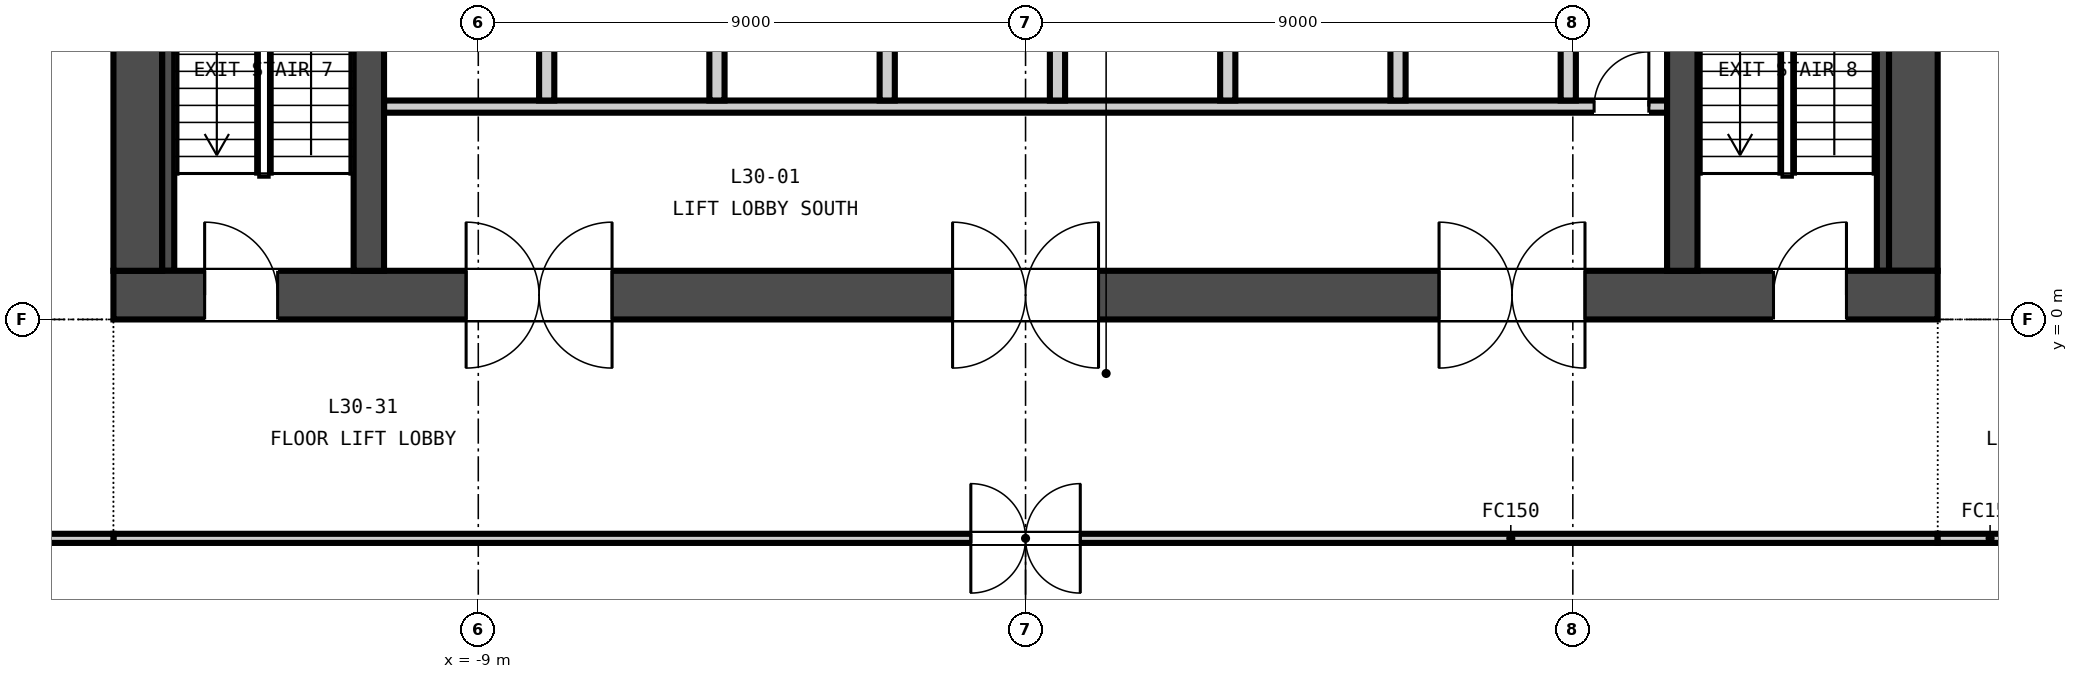
"""IFC4 building model, lengths in metres.
Left out: names, types, materials, properties, quantities, classifications, styles, units other than length and angle.
Written with IfcOpenShell. Run it as: python <this file> out.ifc"""

import sys

from ifc_helpers import new_model, si_unit, direction, frame, frame_2d, origin, place, context, subcontext, project, spatial, rectangle, extrude, element, fill, save


model = new_model("IFC4")
c1 = context("Model", 3, precision=1e-05, world=origin(), true_north=direction((0.0, 1.0)))
c2 = subcontext(c1, "Body", "Model", "MODEL_VIEW")
j1 = project(units=[si_unit("LENGTHUNIT", "METRE"), si_unit("PLANEANGLEUNIT", "RADIAN")], contexts=[c1])
p1 = place(None, origin())
s1 = spatial("IfcSite", under=j1, at=p1, CompositionType="ELEMENT")
p2 = place(p1, origin())
s2 = spatial("IfcBuilding", under=s1, at=p2, CompositionType="ELEMENT")
p3 = place(p2, frame((0.0, 0.0, 126.15)))
s3 = spatial("IfcBuildingStorey", under=s2, at=p3, CompositionType="ELEMENT", Elevation=126.15)
p4 = place(p3, frame((-15.0, 0.4, -0.15), z_axis=(0.0, 0.0, 1.0), x_axis=(1.0, 0.0, 0.0)))
e1 = element("IfcWall", 1, at=p4, inside=s3, PredefinedType="SOLIDWALL", context=c2, shape_type="SweptSolid", body=[
    extrude(rectangle(XDim=30.0, YDim=0.8, at=frame_2d((15.0, 0.0))), origin(), (0.0, 0.0, 1.0), 3.65),
])
p5 = place(p4, frame((5.8, 0.0, 0.15)))
e2 = element("IfcOpeningElement", 2, at=p5, cuts=e1, PredefinedType="OPENING", context=c2, shape_type="SweptSolid", body=[
    extrude(rectangle(XDim=2.4, YDim=2.4, at=frame_2d((1.2, 1.2))), frame((0.0, 0.41, 0.0), z_axis=(0.0, -1.0, 0.0), x_axis=(1.0, 0.0, 0.0)), (0.0, 0.0, 1.0), 0.82),
])
p6 = place(p4, frame((13.8, 0.0, 0.15)))
e3 = element("IfcOpeningElement", 3, at=p6, cuts=e1, PredefinedType="OPENING", context=c2, shape_type="SweptSolid", body=[
    extrude(rectangle(XDim=2.4, YDim=2.4, at=frame_2d((1.2, 1.2))), frame((0.0, 0.41, 0.0), z_axis=(0.0, -1.0, 0.0), x_axis=(1.0, 0.0, 0.0)), (0.0, 0.0, 1.0), 0.82),
])
p7 = place(p4, frame((21.8, 0.0, 0.15)))
e4 = element("IfcOpeningElement", 4, at=p7, cuts=e1, PredefinedType="OPENING", context=c2, shape_type="SweptSolid", body=[
    extrude(rectangle(XDim=2.4, YDim=2.4, at=frame_2d((1.2, 1.2))), frame((0.0, 0.41, 0.0), z_axis=(0.0, -1.0, 0.0), x_axis=(1.0, 0.0, 0.0)), (0.0, 0.0, 1.0), 0.82),
])
p8 = place(p4, frame((1.5, 0.0, 0.15)))
e5 = element("IfcOpeningElement", 5, at=p8, cuts=e1, PredefinedType="OPENING", context=c2, shape_type="SweptSolid", body=[
    extrude(rectangle(XDim=1.2, YDim=2.1, at=frame_2d((0.6, 1.05))), frame((0.0, 0.41, 0.0), z_axis=(0.0, -1.0, 0.0), x_axis=(1.0, 0.0, 0.0)), (0.0, 0.0, 1.0), 0.82),
])
p9 = place(p4, frame((27.3, 0.0, 0.15)))
e6 = element("IfcOpeningElement", 6, at=p9, cuts=e1, PredefinedType="OPENING", context=c2, shape_type="SweptSolid", body=[
    extrude(rectangle(XDim=1.2, YDim=2.1, at=frame_2d((0.6, 1.05))), frame((0.0, 0.41, 0.0), z_axis=(0.0, -1.0, 0.0), x_axis=(1.0, 0.0, 0.0)), (0.0, 0.0, 1.0), 0.82),
])
for number, where, z_axis, x_axis in (
    (7, (-14.6, 0.8, -0.15), (0.0, 0.0, 1.0), (0.0, 1.0, 0.0)),
    (8, (14.6, 0.8, -0.15), (0.0, 0.0, 1.0), (0.0, 1.0, 0.0)),
):
    element("IfcWall", number, at=place(p3, frame(where, z_axis=z_axis, x_axis=x_axis)), inside=s3, PredefinedType="SOLIDWALL", context=c2, shape_type="SweptSolid", body=[
        extrude(rectangle(XDim=13.4, YDim=0.8, at=frame_2d((6.7, 0.0))), origin(), (0.0, 0.0, 1.0), 3.65),
    ])
for number, where, z_axis, x_axis in (
    (9, (-10.8, 0.8, -0.15), (0.0, 0.0, 1.0), (0.0, 1.0, 0.0)),
    (10, (10.8, 0.8, -0.15), (0.0, 0.0, 1.0), (0.0, 1.0, 0.0)),
):
    element("IfcWall", number, at=place(p3, frame(where, z_axis=z_axis, x_axis=x_axis)), inside=s3, PredefinedType="SOLIDWALL", context=c2, shape_type="SweptSolid", body=[
        extrude(rectangle(XDim=13.4, YDim=0.5, at=frame_2d((6.7, 0.0))), origin(), (0.0, 0.0, 1.0), 3.65),
    ])
p10 = place(p3, frame((-10.55, 3.5, 0.0), z_axis=(0.0, 0.0, 1.0), x_axis=(1.0, 0.0, 0.0)))
e11 = element("IfcWall", 11, at=p10, inside=s3, PredefinedType="PARTITIONING", context=c2, shape_type="SweptSolid", body=[
    extrude(rectangle(XDim=21.1, YDim=0.2, at=frame_2d((10.55, 0.0))), origin(), (0.0, 0.0, 1.0), 3.5),
])
p11 = place(p10, frame((19.9, 0.0, 0.0)))
e12 = element("IfcOpeningElement", 12, at=p11, cuts=e11, PredefinedType="OPENING", context=c2, shape_type="SweptSolid", body=[
    extrude(rectangle(XDim=0.9, YDim=2.1, at=frame_2d((0.45, 1.05))), frame((0.0, 0.11, 0.0), z_axis=(0.0, -1.0, 0.0), x_axis=(1.0, 0.0, 0.0)), (0.0, 0.0, 1.0), 0.22),
])
for number, where, z_axis, x_axis in (
    (13, (-7.875, 3.6, 0.0), (0.0, 0.0, 1.0), (0.0, 1.0, 0.0)),
    (14, (-5.075, 3.6, 0.0), (0.0, 0.0, 1.0), (0.0, 1.0, 0.0)),
    (15, (-2.275, 3.6, 0.0), (0.0, 0.0, 1.0), (0.0, 1.0, 0.0)),
    (16, (0.525, 3.6, 0.0), (0.0, 0.0, 1.0), (0.0, 1.0, 0.0)),
    (17, (3.325, 3.6, 0.0), (0.0, 0.0, 1.0), (0.0, 1.0, 0.0)),
    (18, (6.125, 3.6, 0.0), (0.0, 0.0, 1.0), (0.0, 1.0, 0.0)),
    (19, (8.925, 3.6, 0.0), (0.0, 0.0, 1.0), (0.0, 1.0, 0.0)),
):
    element("IfcWall", number, at=place(p3, frame(where, z_axis=z_axis, x_axis=x_axis)), inside=s3, PredefinedType="PARTITIONING", context=c2, shape_type="SweptSolid", body=[
        extrude(rectangle(XDim=2.3, YDim=0.25, at=frame_2d((1.15, 0.0))), origin(), (0.0, 0.0, 1.0), 3.5),
    ])
for number, where, z_axis, x_axis in (
    (20, (-14.1, 0.8, 0.0), (0.0, 0.0, 1.0), (0.0, 1.0, 0.0)),
    (21, (14.1, 0.8, 0.0), (0.0, 0.0, 1.0), (0.0, 1.0, 0.0)),
):
    element("IfcWall", number, at=place(p3, frame(where, z_axis=z_axis, x_axis=x_axis)), inside=s3, PredefinedType="SOLIDWALL", context=c2, shape_type="SweptSolid", body=[
        extrude(rectangle(XDim=13.4, YDim=0.2, at=frame_2d((6.7, 0.0))), origin(), (0.0, 0.0, 1.0), 3.5),
    ])
p12 = place(p3, frame((15.0, -3.6, 0.0), z_axis=(0.0, 0.0, 1.0), x_axis=(-1.0, 0.0, 0.0)))
e22 = element("IfcWall", 22, at=p12, inside=s3, PredefinedType="PARTITIONING", context=c2, shape_type="SweptSolid", body=[
    extrude(rectangle(XDim=30.0, YDim=0.15, at=frame_2d((15.0, 0.0))), origin(), (0.0, 0.0, 1.0), 2.741),
])
p13 = place(p12, frame((14.1, 0.0, 0.0)))
e23 = element("IfcOpeningElement", 23, at=p13, cuts=e22, PredefinedType="OPENING", context=c2, shape_type="SweptSolid", body=[
    extrude(rectangle(XDim=1.8, YDim=2.1, at=frame_2d((0.9, 1.05))), frame((0.0, 0.085, 0.0), z_axis=(0.0, -1.0, 0.0), x_axis=(1.0, 0.0, 0.0)), (0.0, 0.0, 1.0), 0.17),
])
p14 = place(p3, frame((16.714, -3.6, 0.0), z_axis=(0.0, 0.0, 1.0), x_axis=(-1.0, 0.0, 0.0)))
e24 = element("IfcWall", 24, at=p14, inside=s3, PredefinedType="PARTITIONING", context=c2, shape_type="SweptSolid", body=[
    extrude(rectangle(XDim=1.714, YDim=0.15, at=frame_2d((0.857, 0.0))), origin(), (0.0, 0.0, 1.0), 2.741),
])
p15 = place(p3, frame((-15.0, -3.6, 0.0), z_axis=(0.0, 0.0, 1.0), x_axis=(-1.0, 0.0, 0.0)))
e25 = element("IfcWall", 25, at=p15, inside=s3, PredefinedType="PARTITIONING", context=c2, shape_type="SweptSolid", body=[
    extrude(rectangle(XDim=3.9, YDim=0.15, at=frame_2d((1.95, 0.0))), origin(), (0.0, 0.0, 1.0), 2.741),
])
p16 = place(p11, origin())
e26 = element("IfcDoor", 26, at=p16, inside=s3, OperationType="SINGLE_SWING_RIGHT", PredefinedType="DOOR", context=c2, shape_type="SweptSolid", body=[
    extrude(rectangle(XDim=0.9, YDim=2.1, at=frame_2d((0.45, 1.05))), frame((0.0, 0.025, 0.0), z_axis=(0.0, -1.0, 0.0), x_axis=(1.0, 0.0, 0.0)), (0.0, 0.0, 1.0), 0.05),
])
fill(e12, e26)
p17 = place(p5, origin())
e27 = element("IfcDoor", 27, at=p17, inside=s3, OperationType="DOUBLE_DOOR_DOUBLE_SWING", PredefinedType="DOOR", context=c2, shape_type="SweptSolid", body=[
    extrude(rectangle(XDim=2.4, YDim=2.4, at=frame_2d((1.2, 1.2))), frame((0.0, 0.025, 0.0), z_axis=(0.0, -1.0, 0.0), x_axis=(1.0, 0.0, 0.0)), (0.0, 0.0, 1.0), 0.05),
])
fill(e2, e27)
p18 = place(p6, origin())
e28 = element("IfcDoor", 28, at=p18, inside=s3, OperationType="DOUBLE_DOOR_DOUBLE_SWING", PredefinedType="DOOR", context=c2, shape_type="SweptSolid", body=[
    extrude(rectangle(XDim=2.4, YDim=2.4, at=frame_2d((1.2, 1.2))), frame((0.0, 0.025, 0.0), z_axis=(0.0, -1.0, 0.0), x_axis=(1.0, 0.0, 0.0)), (0.0, 0.0, 1.0), 0.05),
])
fill(e3, e28)
p19 = place(p7, origin())
e29 = element("IfcDoor", 29, at=p19, inside=s3, OperationType="DOUBLE_DOOR_DOUBLE_SWING", PredefinedType="DOOR", context=c2, shape_type="SweptSolid", body=[
    extrude(rectangle(XDim=2.4, YDim=2.4, at=frame_2d((1.2, 1.2))), frame((0.0, 0.025, 0.0), z_axis=(0.0, -1.0, 0.0), x_axis=(1.0, 0.0, 0.0)), (0.0, 0.0, 1.0), 0.05),
])
fill(e4, e29)
p20 = place(p8, origin())
e30 = element("IfcDoor", 30, at=p20, inside=s3, OperationType="SINGLE_SWING_LEFT", PredefinedType="DOOR", context=c2, shape_type="SweptSolid", body=[
    extrude(rectangle(XDim=1.2, YDim=2.1, at=frame_2d((0.6, 1.05))), frame((0.0, 0.025, 0.0), z_axis=(0.0, -1.0, 0.0), x_axis=(1.0, 0.0, 0.0)), (0.0, 0.0, 1.0), 0.05),
])
fill(e5, e30)
p21 = place(p9, origin())
e31 = element("IfcDoor", 31, at=p21, inside=s3, OperationType="SINGLE_SWING_RIGHT", PredefinedType="DOOR", context=c2, shape_type="SweptSolid", body=[
    extrude(rectangle(XDim=1.2, YDim=2.1, at=frame_2d((0.6, 1.05))), frame((0.0, 0.025, 0.0), z_axis=(0.0, -1.0, 0.0), x_axis=(1.0, 0.0, 0.0)), (0.0, 0.0, 1.0), 0.05),
])
fill(e6, e31)
p22 = place(p13, origin())
e32 = element("IfcDoor", 32, at=p22, inside=s3, OperationType="DOUBLE_DOOR_DOUBLE_SWING", PredefinedType="DOOR", context=c2, shape_type="SweptSolid", body=[
    extrude(rectangle(XDim=1.8, YDim=2.1, at=frame_2d((0.9, 1.05))), frame((0.0, 0.025, 0.0), z_axis=(0.0, -1.0, 0.0), x_axis=(1.0, 0.0, 0.0)), (0.0, 0.0, 1.0), 0.05),
])
fill(e23, e32)
save(model, sys.argv[1])
